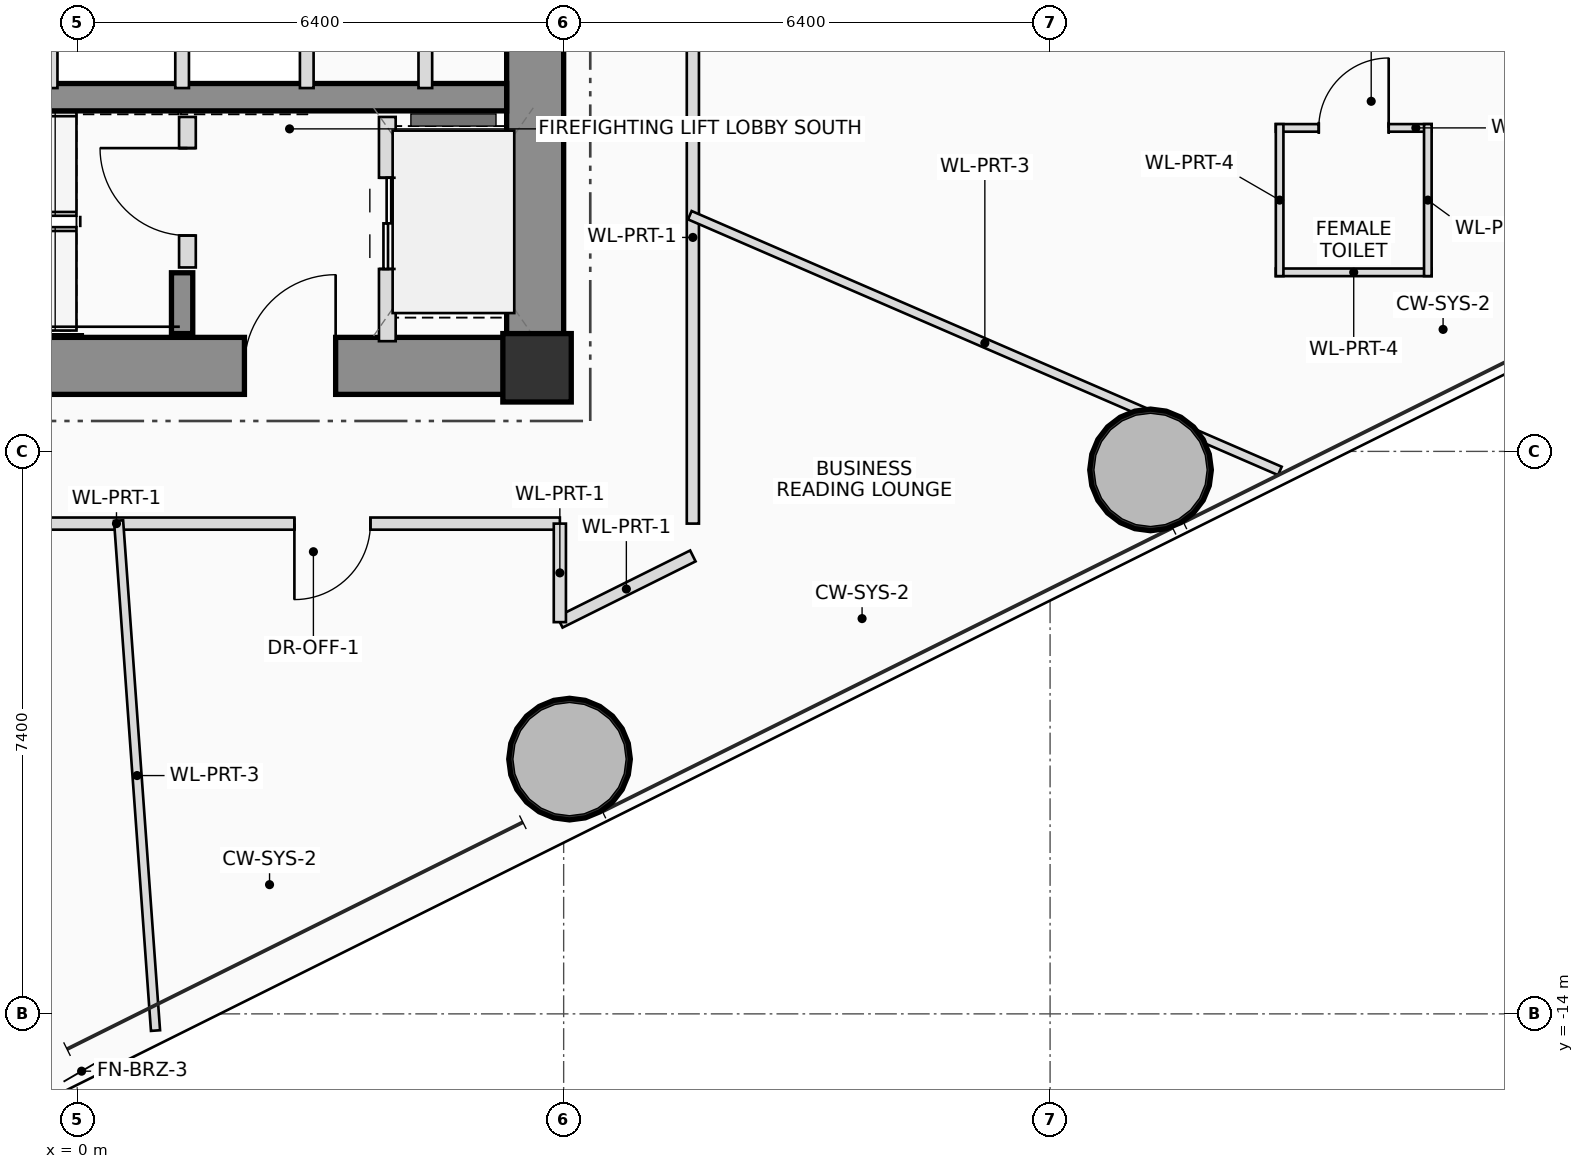
"""IFC4 building model, lengths in metres.
Left out: names, types, materials, properties, quantities, classifications, styles, units other than length and angle.
Written with IfcOpenShell. Run it as: python <this file> out.ifc"""

import sys

from ifc_helpers import new_model, si_unit, direction, frame, frame_2d, origin, origin_2d, place, context, subcontext, project, spatial, rectangle, hollow_circle, extrude, source, transform, mapped, element, fill, save


model = new_model("IFC4")
c1 = context("Model", 3, precision=1e-05, world=origin(), true_north=direction((0.0, 1.0)))
c2 = subcontext(c1, "Body", "Model", "MODEL_VIEW")
j1 = project(units=[si_unit("LENGTHUNIT", "METRE"), si_unit("PLANEANGLEUNIT", "RADIAN")], contexts=[c1])
p1 = place(None, origin())
s1 = spatial("IfcSite", under=j1, at=p1, CompositionType="ELEMENT")
p2 = place(p1, origin())
s2 = spatial("IfcBuilding", under=s1, at=p2, CompositionType="ELEMENT")
p3 = place(p2, frame((0.0, 0.0, 38.6)))
s3 = spatial("IfcBuildingStorey", under=s2, at=p3, CompositionType="ELEMENT", Elevation=38.6)
m1 = source(origin(), c2, "Body", "SweptSolid", [
    extrude(rectangle(XDim=0.9, YDim=0.9, at=origin_2d()), origin(), (0.0, 0.0, 1.0), 3.7),
])
p4 = place(p3, frame((6.05, -5.5, 0.0), z_axis=(0.0, 0.0, 1.0), x_axis=(1.0, 0.0, 0.0)))
e1 = element("IfcColumn", 1, at=p4, inside=s3, PredefinedType="COLUMN", context=c2, shape_type="MappedRepresentation", body=[
    mapped(m1, transform((0.0, 0.0, 0.0), scale=1.0)),
])
p5 = place(p3, frame((-6.4, -5.475, 0.0), z_axis=(0.0, 0.0, 1.0), x_axis=(1.0, 0.0, 0.0)))
e2 = element("IfcWall", 2, at=p5, inside=s3, PredefinedType="SHEAR", context=c2, shape_type="SweptSolid", body=[
    extrude(rectangle(XDim=12.8, YDim=0.75, at=frame_2d((6.4, 0.0))), origin(), (0.0, 0.0, 1.0), 3.7),
])
p6 = place(p5, frame((8.6, 0.0, 0.0)))
e3 = element("IfcOpeningElement", 3, at=p6, cuts=e2, PredefinedType="OPENING", context=c2, shape_type="SweptSolid", body=[
    extrude(rectangle(XDim=1.2, YDim=2.2, at=frame_2d((0.6, 1.1))), frame((0.0, 0.385, 0.0), z_axis=(0.0, -1.0, 0.0), x_axis=(1.0, 0.0, 0.0)), (0.0, 0.0, 1.0), 0.77),
])
p7 = place(p3, frame((6.025, -5.1, 0.0), z_axis=(0.0, 0.0, 1.0), x_axis=(0.0, 1.0, 0.0)))
e4 = element("IfcWall", 4, at=p7, inside=s3, PredefinedType="SHEAR", context=c2, shape_type="SweptSolid", body=[
    extrude(rectangle(XDim=10.2, YDim=0.75, at=frame_2d((5.1, 0.0))), origin(), (0.0, 0.0, 1.0), 3.7),
])
p8 = place(p3, frame((-5.65, -1.94, 0.0), z_axis=(0.0, 0.0, 1.0), x_axis=(1.0, 0.0, 0.0)))
e5 = element("IfcWall", 5, at=p8, inside=s3, PredefinedType="SHEAR", context=c2, shape_type="SweptSolid", body=[
    extrude(rectangle(XDim=11.3, YDim=0.36, at=frame_2d((5.65, 0.0))), origin(), (0.0, 0.0, 1.0), 3.7),
])
p9 = place(p3, frame((1.38, -5.05, 0.0), z_axis=(0.0, 0.0, 1.0), x_axis=(0.0, 1.0, 0.0)))
e6 = element("IfcWall", 6, at=p9, inside=s3, PredefinedType="SHEAR", context=c2, shape_type="SweptSolid", body=[
    extrude(rectangle(XDim=0.8, YDim=0.28, at=frame_2d((0.4, 0.0))), origin(), (0.0, 0.0, 1.0), 3.7),
])
m2 = source(origin(), c2, "Body", "SweptSolid", [
    extrude(hollow_circle(Radius=0.8, WallThickness=0.055, at=origin_2d()), origin(), (0.0, 0.0, 1.0), 3.7),
])
for number, where, z_axis, x_axis in (
    (7, (6.477, -10.648, 0.0), (0.0, 0.0, 1.0), (1.0, 0.0, 0.0)),
    (8, (14.122, -6.844, 0.0), (0.0, 0.0, 1.0), (1.0, 0.0, 0.0)),
):
    element("IfcColumn", number, at=place(p3, frame(where, z_axis=z_axis, x_axis=x_axis)), inside=s3, PredefinedType="COLUMN", context=c2, shape_type="MappedRepresentation", body=[
        mapped(m2, transform((0.0, 0.0, 0.0), scale=1.0)),
    ])
p10 = place(p3, frame((1.45, -4.18, 0.0), z_axis=(0.0, 0.0, 1.0), x_axis=(0.0, 1.0, 0.0)))
e9 = element("IfcWall", 9, at=p10, inside=s3, PredefinedType="PLUMBINGWALL", context=c2, shape_type="SweptSolid", body=[
    extrude(rectangle(XDim=1.98, YDim=0.22, at=frame_2d((0.99, 0.0))), origin(), (0.0, 0.0, 1.0), 3.495),
])
p11 = place(p10, frame((0.42, 0.0, 0.0)))
e10 = element("IfcOpeningElement", 10, at=p11, cuts=e9, PredefinedType="OPENING", context=c2, shape_type="SweptSolid", body=[
    extrude(rectangle(XDim=1.15, YDim=2.15, at=frame_2d((0.575, 1.075))), frame((0.0, 0.12, 0.0), z_axis=(0.0, -1.0, 0.0), x_axis=(1.0, 0.0, 0.0)), (0.0, 0.0, 1.0), 0.24),
])
p12 = place(p3, frame((4.08, -5.15, 0.0), z_axis=(0.0, 0.0, 1.0), x_axis=(0.0, 1.0, 0.0)))
e11 = element("IfcWall", 11, at=p12, inside=s3, PredefinedType="PLUMBINGWALL", context=c2, shape_type="SweptSolid", body=[
    extrude(rectangle(XDim=2.95, YDim=0.22, at=frame_2d((1.475, 0.0))), origin(), (0.0, 0.0, 1.0), 3.495),
])
p13 = place(p12, frame((0.95, 0.0, 0.0)))
e12 = element("IfcOpeningElement", 12, at=p13, cuts=e11, PredefinedType="OPENING", context=c2, shape_type="SweptSolid", body=[
    extrude(rectangle(XDim=1.2, YDim=2.25, at=frame_2d((0.6, 1.125))), frame((0.0, 0.12, 0.0), z_axis=(0.0, -1.0, 0.0), x_axis=(1.0, 0.0, 0.0)), (0.0, 0.0, 1.0), 0.24),
])
for number, where, z_axis, x_axis in (
    (13, (-0.35, -1.82, 0.0), (0.0, 0.0, 1.0), (0.0, 1.0, 0.0)),
    (14, (1.38, -1.82, 0.0), (0.0, 0.0, 1.0), (0.0, 1.0, 0.0)),
    (15, (3.02, -1.82, 0.0), (0.0, 0.0, 1.0), (0.0, 1.0, 0.0)),
):
    element("IfcWall", number, at=place(p3, frame(where, z_axis=z_axis, x_axis=x_axis)), inside=s3, PredefinedType="PLUMBINGWALL", context=c2, shape_type="SweptSolid", body=[
        extrude(rectangle(XDim=0.98, YDim=0.18, at=frame_2d((0.49, 0.0))), origin(), (0.0, 0.0, 1.0), 3.495),
    ])
p14 = place(p3, frame((4.58, -1.82, 0.0), z_axis=(0.0, 0.0, 1.0), x_axis=(0.0, 1.0, 0.0)))
e16 = element("IfcWall", 16, at=p14, inside=s3, PredefinedType="PLUMBINGWALL", context=c2, shape_type="SweptSolid", body=[
    extrude(rectangle(XDim=3.64, YDim=0.18, at=frame_2d((1.82, 0.0))), origin(), (0.0, 0.0, 1.0), 3.495),
])
p15 = place(p14, frame((1.35, 0.0, 0.0)))
e17 = element("IfcOpeningElement", 17, at=p15, cuts=e16, PredefinedType="OPENING", context=c2, shape_type="SweptSolid", body=[
    extrude(rectangle(XDim=0.9, YDim=2.05, at=frame_2d((0.45, 1.025))), frame((0.0, 0.1, 0.0), z_axis=(0.0, -1.0, 0.0), x_axis=(1.0, 0.0, 0.0)), (0.0, 0.0, 1.0), 0.2),
])
p16 = place(p3, frame((15.77, -2.344, 0.0), z_axis=(0.0, 0.0, 1.0), x_axis=(1.0, 0.0, 0.0)))
e18 = element("IfcWall", 18, at=p16, inside=s3, PredefinedType="PARTITIONING", context=c2, shape_type="SweptSolid", body=[
    extrude(rectangle(XDim=2.05, YDim=0.1, at=frame_2d((1.025, 0.0))), origin(), (0.0, 0.0, 1.0), 3.15),
])
p17 = place(p16, frame((0.565, 0.0, 0.0)))
e19 = element("IfcOpeningElement", 19, at=p17, cuts=e18, PredefinedType="OPENING", context=c2, shape_type="SweptSolid", body=[
    extrude(rectangle(XDim=0.92, YDim=2.1, at=frame_2d((0.46, 1.05))), frame((0.0, 0.06, 0.0), z_axis=(0.0, -1.0, 0.0), x_axis=(1.0, 0.0, 0.0)), (0.0, 0.0, 1.0), 0.12),
])
p18 = place(p3, frame((17.82, -4.244, 0.0), z_axis=(0.0, 0.0, 1.0), x_axis=(-1.0, 0.0, 0.0)))
e20 = element("IfcWall", 20, at=p18, inside=s3, PredefinedType="PARTITIONING", context=c2, shape_type="SweptSolid", body=[
    extrude(rectangle(XDim=2.05, YDim=0.1, at=frame_2d((1.025, 0.0))), origin(), (0.0, 0.0, 1.0), 3.495),
])
for number, where, z_axis, x_axis in (
    (21, (17.77, -2.294, 0.0), (0.0, 0.0, 1.0), (0.0, -1.0, 0.0)),
    (22, (15.82, -4.294, 0.0), (0.0, 0.0, 1.0), (0.0, 1.0, 0.0)),
):
    element("IfcWall", number, at=place(p3, frame(where, z_axis=z_axis, x_axis=x_axis)), inside=s3, PredefinedType="PARTITIONING", context=c2, shape_type="SweptSolid", body=[
        extrude(rectangle(XDim=2.0, YDim=0.1, at=frame_2d((1.0, 0.0))), origin(), (0.0, 0.0, 1.0), 2.8),
    ])
p19 = place(p3, frame((6.35, -7.55, 0.0), z_axis=(0.0, 0.0, 1.0), x_axis=(-1.0, 0.0, 0.0)))
e23 = element("IfcWall", 23, at=p19, inside=s3, PredefinedType="PARTITIONING", context=c2, shape_type="SweptSolid", body=[
    extrude(rectangle(XDim=12.7, YDim=0.16, at=frame_2d((6.35, 0.0))), origin(), (0.0, 0.0, 1.0), 2.8),
])
p20 = place(p19, frame((2.493, 0.0, 0.0)))
e24 = element("IfcOpeningElement", 24, at=p20, cuts=e23, PredefinedType="OPENING", context=c2, shape_type="SweptSolid", body=[
    extrude(rectangle(XDim=1.0, YDim=2.25, at=frame_2d((0.5, 1.125))), frame((0.0, 0.09, 0.0), z_axis=(0.0, -1.0, 0.0), x_axis=(1.0, 0.0, 0.0)), (0.0, 0.0, 1.0), 0.18),
])
p21 = place(p19, frame((8.175, 0.0, 0.0)))
e25 = element("IfcOpeningElement", 25, at=p21, cuts=e23, PredefinedType="OPENING", context=c2, shape_type="SweptSolid", body=[
    extrude(rectangle(XDim=1.0, YDim=2.25, at=frame_2d((0.5, 1.125))), frame((0.0, 0.09, 0.0), z_axis=(0.0, -1.0, 0.0), x_axis=(1.0, 0.0, 0.0)), (0.0, 0.0, 1.0), 0.18),
])
p22 = place(p3, frame((8.1, -0.02, 0.0), z_axis=(0.0, 0.0, 1.0), x_axis=(0.0, -1.0, 0.0)))
e26 = element("IfcWall", 26, at=p22, inside=s3, PredefinedType="PARTITIONING", context=c2, shape_type="SweptSolid", body=[
    extrude(rectangle(XDim=7.53, YDim=0.16, at=frame_2d((3.765, 0.0))), origin(), (0.0, 0.0, 1.0), 2.8),
])
p23 = place(p3, frame((8.1, -7.975, 0.0), z_axis=(0.0, 0.0, 1.0), x_axis=(-0.89527489017, -0.445514164793, 0.0)))
e27 = element("IfcWall", 27, at=p23, inside=s3, PredefinedType="PARTITIONING", context=c2, shape_type="SweptSolid", body=[
    extrude(rectangle(XDim=1.955, YDim=0.16, at=frame_2d((0.977, 0.0))), origin(), (0.0, 0.0, 1.0), 2.8),
])
p24 = place(p3, frame((6.35, -8.846, 0.0), z_axis=(0.0, 0.0, 1.0), x_axis=(0.0, 1.0, 0.0)))
e28 = element("IfcWall", 28, at=p24, inside=s3, PredefinedType="PARTITIONING", context=c2, shape_type="SweptSolid", body=[
    extrude(rectangle(XDim=1.296, YDim=0.16, at=frame_2d((0.648, 0.0))), origin(), (0.0, 0.0, 1.0), 2.8),
])
p25 = place(p3, frame((0.544, -7.51, 0.0), z_axis=(0.0, 0.0, 1.0), x_axis=(0.072255425025, -0.997386160699, 0.0)))
e29 = element("IfcWall", 29, at=p25, inside=s3, PredefinedType="PARTITIONING", context=c2, shape_type="SweptSolid", body=[
    extrude(rectangle(XDim=6.727, YDim=0.12, at=frame_2d((3.364, 0.0))), origin(), (0.0, 0.0, 1.0), 2.96),
])
p26 = place(p3, frame((8.06, -3.493, 0.0), z_axis=(0.0, 0.0, 1.0), x_axis=(0.917561590562, -0.397593671385, 0.0)))
e30 = element("IfcWall", 30, at=p26, inside=s3, PredefinedType="PARTITIONING", context=c2, shape_type="SweptSolid", body=[
    extrude(rectangle(XDim=8.461, YDim=0.12, at=frame_2d((4.23, 0.0))), origin(), (0.0, 0.0, 1.0), 2.8),
])
p27 = place(p6, origin())
e31 = element("IfcDoor", 31, at=p27, inside=s3, OperationType="SINGLE_SWING_RIGHT", PredefinedType="DOOR", context=c2, shape_type="SweptSolid", body=[
    extrude(rectangle(XDim=1.2, YDim=2.2, at=frame_2d((0.6, 1.1))), frame((0.0, 0.025, 0.0), z_axis=(0.0, -1.0, 0.0), x_axis=(1.0, 0.0, 0.0)), (0.0, 0.0, 1.0), 0.05),
])
fill(e3, e31)
p28 = place(p11, origin())
e32 = element("IfcDoor", 32, at=p28, inside=s3, OperationType="SINGLE_SWING_RIGHT", PredefinedType="DOOR", context=c2, shape_type="SweptSolid", body=[
    extrude(rectangle(XDim=1.15, YDim=2.15, at=frame_2d((0.575, 1.075))), frame((0.0, 0.025, 0.0), z_axis=(0.0, -1.0, 0.0), x_axis=(1.0, 0.0, 0.0)), (0.0, 0.0, 1.0), 0.05),
])
fill(e10, e32)
p29 = place(p13, origin())
e33 = element("IfcDoor", 33, at=p29, inside=s3, OperationType="DOUBLE_DOOR_SLIDING", PredefinedType="DOOR", context=c2, shape_type="SweptSolid", body=[
    extrude(rectangle(XDim=1.2, YDim=2.25, at=frame_2d((0.6, 1.125))), frame((0.0, 0.025, 0.0), z_axis=(0.0, -1.0, 0.0), x_axis=(1.0, 0.0, 0.0)), (0.0, 0.0, 1.0), 0.05),
])
fill(e12, e33)
p30 = place(p17, origin())
e34 = element("IfcDoor", 34, at=p30, inside=s3, OperationType="SINGLE_SWING_RIGHT", PredefinedType="DOOR", context=c2, shape_type="SweptSolid", body=[
    extrude(rectangle(XDim=0.92, YDim=2.1, at=frame_2d((0.46, 1.05))), frame((0.0, 0.025, 0.0), z_axis=(0.0, -1.0, 0.0), x_axis=(1.0, 0.0, 0.0)), (0.0, 0.0, 1.0), 0.05),
])
fill(e19, e34)
p31 = place(p20, origin())
e35 = element("IfcDoor", 35, at=p31, inside=s3, OperationType="SINGLE_SWING_RIGHT", PredefinedType="DOOR", context=c2, shape_type="SweptSolid", body=[
    extrude(rectangle(XDim=1.0, YDim=2.25, at=frame_2d((0.5, 1.125))), frame((0.0, 0.025, 0.0), z_axis=(0.0, -1.0, 0.0), x_axis=(1.0, 0.0, 0.0)), (0.0, 0.0, 1.0), 0.05),
])
fill(e24, e35)
save(model, sys.argv[1])
